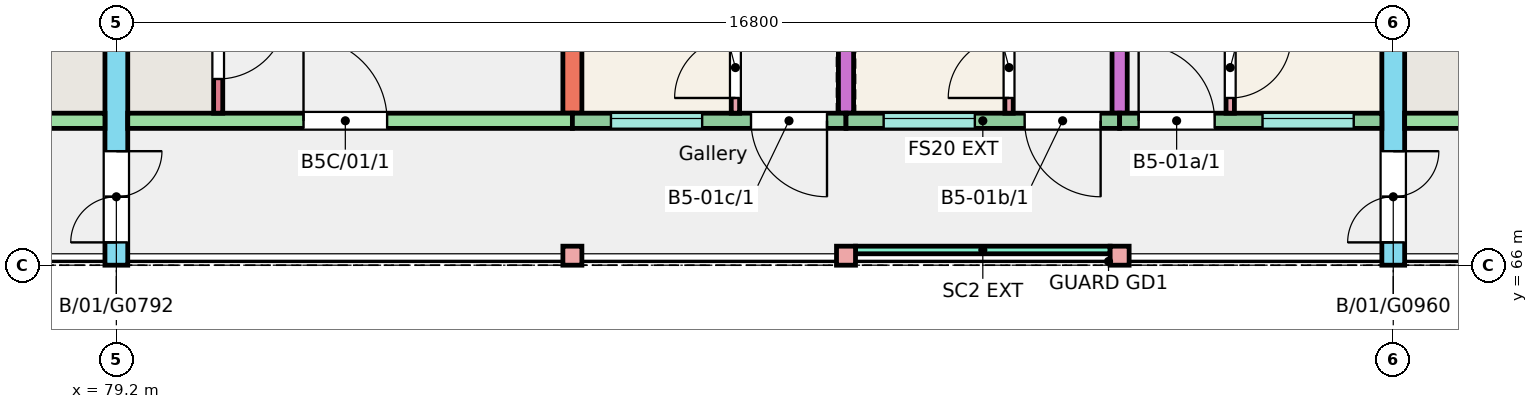
"""IFC4 building model, lengths in metres.
Left out: names, types, materials, properties, quantities, classifications, styles, units other than length and angle.
Written with IfcOpenShell. Run it as: python <this file> out.ifc"""

import sys

from ifc_helpers import new_model, si_unit, direction, frame, frame_2d, origin, origin_2d, place, context, subcontext, project, spatial, rectangle, extrude, element, fill, save


model = new_model("IFC4")
c1 = context("Model", 3, precision=1e-05, world=origin(), true_north=direction((0.0, 1.0)))
c2 = subcontext(c1, "Body", "Model", "MODEL_VIEW")
j1 = project(units=[si_unit("LENGTHUNIT", "METRE"), si_unit("PLANEANGLEUNIT", "RADIAN")], contexts=[c1])
p1 = place(None, origin())
s1 = spatial("IfcSite", under=j1, at=p1, CompositionType="ELEMENT")
p2 = place(p1, origin())
s2 = spatial("IfcBuilding", under=s1, at=p2, CompositionType="ELEMENT")
p3 = place(p2, frame((0.0, 0.0, 3.0)))
s3 = spatial("IfcBuildingStorey", under=s2, at=p3, CompositionType="ELEMENT", Elevation=3.0)
p4 = place(p3, frame((79.2, 66.0, 0.0), z_axis=(0.0, 0.0, 1.0), x_axis=(0.0, 1.0, 0.0)))
e1 = element("IfcWall", 1, at=p4, inside=s3, PredefinedType="SHEAR", context=c2, shape_type="SweptSolid", body=[
    extrude(rectangle(XDim=11.0, YDim=0.3, at=frame_2d((5.5, 0.0))), origin(), (0.0, 0.0, 1.0), 3.0),
])
p5 = place(p4, frame((0.3, 0.0, 0.0)))
e2 = element("IfcOpeningElement", 2, at=p5, cuts=e1, PredefinedType="OPENING", context=c2, shape_type="SweptSolid", body=[
    extrude(rectangle(XDim=1.2, YDim=2.1, at=frame_2d((0.6, 1.05))), frame((0.0, 0.16, 0.0), z_axis=(0.0, -1.0, 0.0), x_axis=(1.0, 0.0, 0.0)), (0.0, 0.0, 1.0), 0.32),
])
p6 = place(p3, frame((85.2, 68.0, 0.0), z_axis=(0.0, 0.0, 1.0), x_axis=(0.0, 1.0, 0.0)))
e3 = element("IfcWall", 3, at=p6, inside=s3, PredefinedType="SHEAR", context=c2, shape_type="SweptSolid", body=[
    extrude(rectangle(XDim=9.0, YDim=0.25, at=frame_2d((4.5, 0.0))), origin(), (0.0, 0.0, 1.0), 3.0),
])
for number, where, z_axis, x_axis in (
    (4, (88.8, 68.0, 0.0), (0.0, 0.0, 1.0), (0.0, 1.0, 0.0)),
    (5, (92.4, 68.0, 0.0), (0.0, 0.0, 1.0), (0.0, 1.0, 0.0)),
):
    element("IfcWall", number, at=place(p3, frame(where, z_axis=z_axis, x_axis=x_axis)), inside=s3, PredefinedType="SHEAR", context=c2, shape_type="SweptSolid", body=[
        extrude(rectangle(XDim=9.0, YDim=0.2, at=frame_2d((4.5, 0.0))), origin(), (0.0, 0.0, 1.0), 3.0),
    ])
p7 = place(p3, frame((96.0, 66.0, 0.0), z_axis=(0.0, 0.0, 1.0), x_axis=(0.0, 1.0, 0.0)))
e6 = element("IfcWall", 6, at=p7, inside=s3, PredefinedType="SHEAR", context=c2, shape_type="SweptSolid", body=[
    extrude(rectangle(XDim=11.0, YDim=0.3, at=frame_2d((5.5, 0.0))), origin(), (0.0, 0.0, 1.0), 3.0),
])
p8 = place(p7, frame((0.3, 0.0, 0.0)))
e7 = element("IfcOpeningElement", 7, at=p8, cuts=e6, PredefinedType="OPENING", context=c2, shape_type="SweptSolid", body=[
    extrude(rectangle(XDim=1.2, YDim=2.1, at=frame_2d((0.6, 1.05))), frame((0.0, 0.16, 0.0), z_axis=(0.0, -1.0, 0.0), x_axis=(1.0, 0.0, 0.0)), (0.0, 0.0, 1.0), 0.32),
])
p9 = place(p3, frame((73.2, 67.9, 0.0), z_axis=(0.0, 0.0, 1.0), x_axis=(1.0, 0.0, 0.0)))
e8 = element("IfcWall", 8, at=p9, inside=s3, PredefinedType="SHEAR", context=c2, shape_type="SweptSolid", body=[
    extrude(rectangle(XDim=5.85, YDim=0.2, at=frame_2d((2.925, 0.0))), origin(), (0.0, 0.0, 1.0), 3.0),
])
p10 = place(p9, frame((2.438, 0.0, 0.0)))
e9 = element("IfcOpeningElement", 9, at=p10, cuts=e8, PredefinedType="OPENING", context=c2, shape_type="SweptSolid", body=[
    extrude(rectangle(XDim=1.1, YDim=2.1, at=frame_2d((0.55, 1.05))), frame((0.0, 0.11, 0.0), z_axis=(0.0, -1.0, 0.0), x_axis=(1.0, 0.0, 0.0)), (0.0, 0.0, 1.0), 0.22),
])
p11 = place(p3, frame((79.35, 67.9, 0.0), z_axis=(0.0, 0.0, 1.0), x_axis=(1.0, 0.0, 0.0)))
e10 = element("IfcWall", 10, at=p11, inside=s3, PredefinedType="SHEAR", context=c2, shape_type="SweptSolid", body=[
    extrude(rectangle(XDim=5.85, YDim=0.2, at=frame_2d((2.925, 0.0))), origin(), (0.0, 0.0, 1.0), 3.0),
])
p12 = place(p11, frame((2.312, 0.0, 0.0)))
e11 = element("IfcOpeningElement", 11, at=p12, cuts=e10, PredefinedType="OPENING", context=c2, shape_type="SweptSolid", body=[
    extrude(rectangle(XDim=1.1, YDim=2.1, at=frame_2d((0.55, 1.05))), frame((0.0, 0.11, 0.0), z_axis=(0.0, -1.0, 0.0), x_axis=(1.0, 0.0, 0.0)), (0.0, 0.0, 1.0), 0.22),
])
p13 = place(p3, frame((80.54, 68.0, 0.0), z_axis=(0.0, 0.0, 1.0), x_axis=(0.0, 1.0, 0.0)))
e12 = element("IfcWall", 12, at=p13, inside=s3, PredefinedType="SHEAR", context=c2, shape_type="SweptSolid", body=[
    extrude(rectangle(XDim=1.72, YDim=0.12, at=frame_2d((0.86, 0.0))), origin(), (0.0, 0.0, 1.0), 3.0),
])
p14 = place(p13, frame((0.45, 0.0, 0.0)))
e13 = element("IfcOpeningElement", 13, at=p14, cuts=e12, PredefinedType="OPENING", context=c2, shape_type="SweptSolid", body=[
    extrude(rectangle(XDim=0.9, YDim=2.1, at=frame_2d((0.45, 1.05))), frame((0.0, 0.07, 0.0), z_axis=(0.0, -1.0, 0.0), x_axis=(1.0, 0.0, 0.0)), (0.0, 0.0, 1.0), 0.14),
])
p15 = place(p3, frame((85.2, 67.9, 0.0), z_axis=(0.0, 0.0, 1.0), x_axis=(1.0, 0.0, 0.0)))
e14 = element("IfcWall", 14, at=p15, inside=s3, PredefinedType="SOLIDWALL", context=c2, shape_type="SweptSolid", body=[
    extrude(rectangle(XDim=3.6, YDim=0.2, at=frame_2d((1.8, 0.0))), origin(), (0.0, 0.0, 1.0), 3.0),
])
p16 = place(p15, frame((0.508, 0.0, 1.1)))
e15 = element("IfcOpeningElement", 15, at=p16, cuts=e14, PredefinedType="OPENING", context=c2, shape_type="SweptSolid", body=[
    extrude(rectangle(XDim=1.2, YDim=1.3, at=frame_2d((0.6, 0.65))), frame((0.0, 0.11, 0.0), z_axis=(0.0, -1.0, 0.0), x_axis=(1.0, 0.0, 0.0)), (0.0, 0.0, 1.0), 0.22),
])
p17 = place(p15, frame((2.35, 0.0, 0.0)))
e16 = element("IfcOpeningElement", 16, at=p17, cuts=e14, PredefinedType="OPENING", context=c2, shape_type="SweptSolid", body=[
    extrude(rectangle(XDim=1.0, YDim=2.1, at=frame_2d((0.5, 1.05))), frame((0.0, 0.11, 0.0), z_axis=(0.0, -1.0, 0.0), x_axis=(1.0, 0.0, 0.0)), (0.0, 0.0, 1.0), 0.22),
])
p18 = place(p3, frame((88.8, 67.9, 0.0), z_axis=(0.0, 0.0, 1.0), x_axis=(1.0, 0.0, 0.0)))
e17 = element("IfcWall", 17, at=p18, inside=s3, PredefinedType="SOLIDWALL", context=c2, shape_type="SweptSolid", body=[
    extrude(rectangle(XDim=3.6, YDim=0.2, at=frame_2d((1.8, 0.0))), origin(), (0.0, 0.0, 1.0), 3.0),
])
p19 = place(p18, frame((0.495, 0.0, 1.1)))
e18 = element("IfcOpeningElement", 18, at=p19, cuts=e17, PredefinedType="OPENING", context=c2, shape_type="SweptSolid", body=[
    extrude(rectangle(XDim=1.2, YDim=1.3, at=frame_2d((0.6, 0.65))), frame((0.0, 0.11, 0.0), z_axis=(0.0, -1.0, 0.0), x_axis=(1.0, 0.0, 0.0)), (0.0, 0.0, 1.0), 0.22),
])
p20 = place(p18, frame((2.35, 0.0, 0.0)))
e19 = element("IfcOpeningElement", 19, at=p20, cuts=e17, PredefinedType="OPENING", context=c2, shape_type="SweptSolid", body=[
    extrude(rectangle(XDim=1.0, YDim=2.1, at=frame_2d((0.5, 1.05))), frame((0.0, 0.11, 0.0), z_axis=(0.0, -1.0, 0.0), x_axis=(1.0, 0.0, 0.0)), (0.0, 0.0, 1.0), 0.22),
])
p21 = place(p3, frame((92.4, 67.9, 0.0), z_axis=(0.0, 0.0, 1.0), x_axis=(1.0, 0.0, 0.0)))
e20 = element("IfcWall", 20, at=p21, inside=s3, PredefinedType="SOLIDWALL", context=c2, shape_type="SweptSolid", body=[
    extrude(rectangle(XDim=3.45, YDim=0.2, at=frame_2d((1.725, 0.0))), origin(), (0.0, 0.0, 1.0), 3.0),
])
p22 = place(p21, frame((1.88, 0.0, 1.1)))
e21 = element("IfcOpeningElement", 21, at=p22, cuts=e20, PredefinedType="OPENING", context=c2, shape_type="SweptSolid", body=[
    extrude(rectangle(XDim=1.2, YDim=1.3, at=frame_2d((0.6, 0.65))), frame((0.0, 0.11, 0.0), z_axis=(0.0, -1.0, 0.0), x_axis=(1.0, 0.0, 0.0)), (0.0, 0.0, 1.0), 0.22),
])
p23 = place(p21, frame((0.25, 0.0, 0.0)))
e22 = element("IfcOpeningElement", 22, at=p23, cuts=e20, PredefinedType="OPENING", context=c2, shape_type="SweptSolid", body=[
    extrude(rectangle(XDim=1.0, YDim=2.1, at=frame_2d((0.5, 1.05))), frame((0.0, 0.11, 0.0), z_axis=(0.0, -1.0, 0.0), x_axis=(1.0, 0.0, 0.0)), (0.0, 0.0, 1.0), 0.22),
])
p24 = place(p3, frame((96.15, 67.9, 0.0), z_axis=(0.0, 0.0, 1.0), x_axis=(1.0, 0.0, 0.0)))
e23 = element("IfcWall", 23, at=p24, inside=s3, PredefinedType="SHEAR", context=c2, shape_type="SweptSolid", body=[
    extrude(rectangle(XDim=5.85, YDim=0.2, at=frame_2d((2.925, 0.0))), origin(), (0.0, 0.0, 1.0), 3.0),
])
p25 = place(p24, frame((2.312, 0.0, 0.0)))
e24 = element("IfcOpeningElement", 24, at=p25, cuts=e23, PredefinedType="OPENING", context=c2, shape_type="SweptSolid", body=[
    extrude(rectangle(XDim=1.1, YDim=2.1, at=frame_2d((0.55, 1.05))), frame((0.0, 0.11, 0.0), z_axis=(0.0, -1.0, 0.0), x_axis=(1.0, 0.0, 0.0)), (0.0, 0.0, 1.0), 0.22),
])
for number, where, z_axis, x_axis in (
    (25, (85.2, 66.125, 0.0), (0.0, 0.0, 1.0), (1.0, 0.0, 0.0)),
    (26, (88.8, 66.125, 0.0), (0.0, 0.0, 1.0), (1.0, 0.0, 0.0)),
    (27, (92.4, 66.125, 0.0), (0.0, 0.0, 1.0), (1.0, 0.0, 0.0)),
):
    element("IfcColumn", number, at=place(p3, frame(where, z_axis=z_axis, x_axis=x_axis)), inside=s3, PredefinedType="COLUMN", context=c2, shape_type="SweptSolid", body=[
        extrude(rectangle(XDim=0.25, YDim=0.25, at=origin_2d()), origin(), (0.0, 0.0, 1.0), 3.0),
    ])
p26 = place(p3, frame((88.925, 66.2, 0.0), z_axis=(0.0, 0.0, 1.0), x_axis=(1.0, 0.0, 0.0)))
e28 = element("IfcWall", 28, at=p26, inside=s3, PredefinedType="SOLIDWALL", context=c2, shape_type="SweptSolid", body=[
    extrude(rectangle(XDim=3.35, YDim=0.1, at=frame_2d((1.675, 0.0))), origin(), (0.0, 0.0, 1.0), 2.45),
])
p27 = place(p3, frame((93.855, 68.0, 0.0), z_axis=(0.0, 0.0, 1.0), x_axis=(0.0, 1.0, 0.0)))
e29 = element("IfcWall", 29, at=p27, inside=s3, PredefinedType="PARTITIONING", context=c2, shape_type="SweptSolid", body=[
    extrude(rectangle(XDim=4.3, YDim=0.11, at=frame_2d((2.15, 0.0))), origin(), (0.0, 0.0, 1.0), 2.8),
])
p28 = place(p27, frame((0.2, 0.0, 0.0)))
e30 = element("IfcOpeningElement", 30, at=p28, cuts=e29, PredefinedType="OPENING", context=c2, shape_type="SweptSolid", body=[
    extrude(rectangle(XDim=0.8, YDim=2.1, at=frame_2d((0.4, 1.05))), frame((0.0, 0.065, 0.0), z_axis=(0.0, -1.0, 0.0), x_axis=(1.0, 0.0, 0.0)), (0.0, 0.0, 1.0), 0.13),
])
p29 = place(p27, frame((3.35, 0.0, 0.0)))
e31 = element("IfcOpeningElement", 31, at=p29, cuts=e29, PredefinedType="OPENING", context=c2, shape_type="SweptSolid", body=[
    extrude(rectangle(XDim=0.8, YDim=2.1, at=frame_2d((0.4, 1.05))), frame((0.0, 0.065, 0.0), z_axis=(0.0, -1.0, 0.0), x_axis=(1.0, 0.0, 0.0)), (0.0, 0.0, 1.0), 0.13),
])
p30 = place(p3, frame((90.945, 68.0, 0.0), z_axis=(0.0, 0.0, 1.0), x_axis=(0.0, 1.0, 0.0)))
e32 = element("IfcWall", 32, at=p30, inside=s3, PredefinedType="PARTITIONING", context=c2, shape_type="SweptSolid", body=[
    extrude(rectangle(XDim=4.5, YDim=0.11, at=frame_2d((2.25, 0.0))), origin(), (0.0, 0.0, 1.0), 2.8),
])
p31 = place(p30, frame((0.2, 0.0, 0.0)))
e33 = element("IfcOpeningElement", 33, at=p31, cuts=e32, PredefinedType="OPENING", context=c2, shape_type="SweptSolid", body=[
    extrude(rectangle(XDim=0.8, YDim=2.1, at=frame_2d((0.4, 1.05))), frame((0.0, 0.065, 0.0), z_axis=(0.0, -1.0, 0.0), x_axis=(1.0, 0.0, 0.0)), (0.0, 0.0, 1.0), 0.13),
])
p32 = place(p30, frame((3.55, 0.0, 0.0)))
e34 = element("IfcOpeningElement", 34, at=p32, cuts=e32, PredefinedType="OPENING", context=c2, shape_type="SweptSolid", body=[
    extrude(rectangle(XDim=0.8, YDim=2.1, at=frame_2d((0.4, 1.05))), frame((0.0, 0.065, 0.0), z_axis=(0.0, -1.0, 0.0), x_axis=(1.0, 0.0, 0.0)), (0.0, 0.0, 1.0), 0.13),
])
p33 = place(p3, frame((87.345, 68.0, 0.0), z_axis=(0.0, 0.0, 1.0), x_axis=(0.0, 1.0, 0.0)))
e35 = element("IfcWall", 35, at=p33, inside=s3, PredefinedType="PARTITIONING", context=c2, shape_type="SweptSolid", body=[
    extrude(rectangle(XDim=4.3, YDim=0.11, at=frame_2d((2.15, 0.0))), origin(), (0.0, 0.0, 1.0), 2.8),
])
p34 = place(p33, frame((0.2, 0.0, 0.0)))
e36 = element("IfcOpeningElement", 36, at=p34, cuts=e35, PredefinedType="OPENING", context=c2, shape_type="SweptSolid", body=[
    extrude(rectangle(XDim=0.8, YDim=2.1, at=frame_2d((0.4, 1.05))), frame((0.0, 0.065, 0.0), z_axis=(0.0, -1.0, 0.0), x_axis=(1.0, 0.0, 0.0)), (0.0, 0.0, 1.0), 0.13),
])
p35 = place(p33, frame((3.35, 0.0, 0.0)))
e37 = element("IfcOpeningElement", 37, at=p35, cuts=e35, PredefinedType="OPENING", context=c2, shape_type="SweptSolid", body=[
    extrude(rectangle(XDim=0.8, YDim=2.1, at=frame_2d((0.4, 1.05))), frame((0.0, 0.065, 0.0), z_axis=(0.0, -1.0, 0.0), x_axis=(1.0, 0.0, 0.0)), (0.0, 0.0, 1.0), 0.13),
])
p36 = place(p22, origin())
e38 = element("IfcWindow", 38, at=p36, inside=s3, PartitioningType="SINGLE_PANEL", PredefinedType="WINDOW", context=c2, shape_type="SweptSolid", body=[
    extrude(rectangle(XDim=1.2, YDim=1.3, at=frame_2d((0.6, 0.65))), frame((0.0, 0.06, 0.0), z_axis=(0.0, -1.0, 0.0), x_axis=(1.0, 0.0, 0.0)), (0.0, 0.0, 1.0), 0.06),
])
fill(e21, e38)
p37 = place(p19, origin())
e39 = element("IfcWindow", 39, at=p37, inside=s3, PartitioningType="SINGLE_PANEL", PredefinedType="WINDOW", context=c2, shape_type="SweptSolid", body=[
    extrude(rectangle(XDim=1.2, YDim=1.3, at=frame_2d((0.6, 0.65))), frame((0.0, 0.06, 0.0), z_axis=(0.0, -1.0, 0.0), x_axis=(1.0, 0.0, 0.0)), (0.0, 0.0, 1.0), 0.06),
])
fill(e18, e39)
p38 = place(p16, origin())
e40 = element("IfcWindow", 40, at=p38, inside=s3, PartitioningType="SINGLE_PANEL", PredefinedType="WINDOW", context=c2, shape_type="SweptSolid", body=[
    extrude(rectangle(XDim=1.2, YDim=1.3, at=frame_2d((0.6, 0.65))), frame((0.0, 0.06, 0.0), z_axis=(0.0, -1.0, 0.0), x_axis=(1.0, 0.0, 0.0)), (0.0, 0.0, 1.0), 0.06),
])
fill(e15, e40)
p39 = place(p23, origin())
e41 = element("IfcDoor", 41, at=p39, inside=s3, OperationType="SINGLE_SWING_LEFT", PredefinedType="DOOR", context=c2, shape_type="SweptSolid", body=[
    extrude(rectangle(XDim=1.0, YDim=2.1, at=frame_2d((0.5, 1.05))), frame((0.0, 0.025, 0.0), z_axis=(0.0, -1.0, 0.0), x_axis=(1.0, 0.0, 0.0)), (0.0, 0.0, 1.0), 0.05),
])
fill(e22, e41)
p40 = place(p28, origin())
e42 = element("IfcDoor", 42, at=p40, inside=s3, OperationType="SINGLE_SWING_RIGHT", PredefinedType="DOOR", context=c2, shape_type="SweptSolid", body=[
    extrude(rectangle(XDim=0.8, YDim=2.1, at=frame_2d((0.4, 1.05))), frame((0.0, 0.025, 0.0), z_axis=(0.0, -1.0, 0.0), x_axis=(1.0, 0.0, 0.0)), (0.0, 0.0, 1.0), 0.05),
])
fill(e30, e42)
p41 = place(p20, origin())
e43 = element("IfcDoor", 43, at=p41, inside=s3, OperationType="SINGLE_SWING_RIGHT", PredefinedType="DOOR", context=c2, shape_type="SweptSolid", body=[
    extrude(rectangle(XDim=1.0, YDim=2.1, at=frame_2d((0.5, 1.05))), frame((0.0, 0.025, 0.0), z_axis=(0.0, -1.0, 0.0), x_axis=(1.0, 0.0, 0.0)), (0.0, 0.0, 1.0), 0.05),
])
fill(e19, e43)
p42 = place(p31, origin())
e44 = element("IfcDoor", 44, at=p42, inside=s3, OperationType="SINGLE_SWING_LEFT", PredefinedType="DOOR", context=c2, shape_type="SweptSolid", body=[
    extrude(rectangle(XDim=0.8, YDim=2.1, at=frame_2d((0.4, 1.05))), frame((0.0, 0.025, 0.0), z_axis=(0.0, -1.0, 0.0), x_axis=(1.0, 0.0, 0.0)), (0.0, 0.0, 1.0), 0.05),
])
fill(e33, e44)
p43 = place(p17, origin())
e45 = element("IfcDoor", 45, at=p43, inside=s3, OperationType="SINGLE_SWING_RIGHT", PredefinedType="DOOR", context=c2, shape_type="SweptSolid", body=[
    extrude(rectangle(XDim=1.0, YDim=2.1, at=frame_2d((0.5, 1.05))), frame((0.0, 0.025, 0.0), z_axis=(0.0, -1.0, 0.0), x_axis=(1.0, 0.0, 0.0)), (0.0, 0.0, 1.0), 0.05),
])
fill(e16, e45)
p44 = place(p34, origin())
e46 = element("IfcDoor", 46, at=p44, inside=s3, OperationType="SINGLE_SWING_LEFT", PredefinedType="DOOR", context=c2, shape_type="SweptSolid", body=[
    extrude(rectangle(XDim=0.8, YDim=2.1, at=frame_2d((0.4, 1.05))), frame((0.0, 0.025, 0.0), z_axis=(0.0, -1.0, 0.0), x_axis=(1.0, 0.0, 0.0)), (0.0, 0.0, 1.0), 0.05),
])
fill(e36, e46)
p45 = place(p12, origin())
e47 = element("IfcDoor", 47, at=p45, inside=s3, OperationType="SINGLE_SWING_LEFT", PredefinedType="DOOR", context=c2, shape_type="SweptSolid", body=[
    extrude(rectangle(XDim=1.1, YDim=2.1, at=frame_2d((0.55, 1.05))), frame((0.0, 0.025, 0.0), z_axis=(0.0, -1.0, 0.0), x_axis=(1.0, 0.0, 0.0)), (0.0, 0.0, 1.0), 0.05),
])
fill(e11, e47)
p46 = place(p14, origin())
e48 = element("IfcDoor", 48, at=p46, inside=s3, OperationType="SINGLE_SWING_RIGHT", PredefinedType="DOOR", context=c2, shape_type="SweptSolid", body=[
    extrude(rectangle(XDim=0.9, YDim=2.1, at=frame_2d((0.45, 1.05))), frame((0.0, 0.025, 0.0), z_axis=(0.0, -1.0, 0.0), x_axis=(1.0, 0.0, 0.0)), (0.0, 0.0, 1.0), 0.05),
])
fill(e13, e48)
p47 = place(p5, origin())
e49 = element("IfcDoor", 49, at=p47, inside=s3, OperationType="DOUBLE_DOOR_SINGLE_SWING", PredefinedType="DOOR", context=c2, shape_type="SweptSolid", body=[
    extrude(rectangle(XDim=1.2, YDim=2.1, at=frame_2d((0.6, 1.05))), frame((0.0, 0.025, 0.0), z_axis=(0.0, -1.0, 0.0), x_axis=(1.0, 0.0, 0.0)), (0.0, 0.0, 1.0), 0.05),
])
fill(e2, e49)
p48 = place(p8, origin())
e50 = element("IfcDoor", 50, at=p48, inside=s3, OperationType="DOUBLE_DOOR_SINGLE_SWING", PredefinedType="DOOR", context=c2, shape_type="SweptSolid", body=[
    extrude(rectangle(XDim=1.2, YDim=2.1, at=frame_2d((0.6, 1.05))), frame((0.0, 0.025, 0.0), z_axis=(0.0, -1.0, 0.0), x_axis=(1.0, 0.0, 0.0)), (0.0, 0.0, 1.0), 0.05),
])
fill(e7, e50)
save(model, sys.argv[1])
